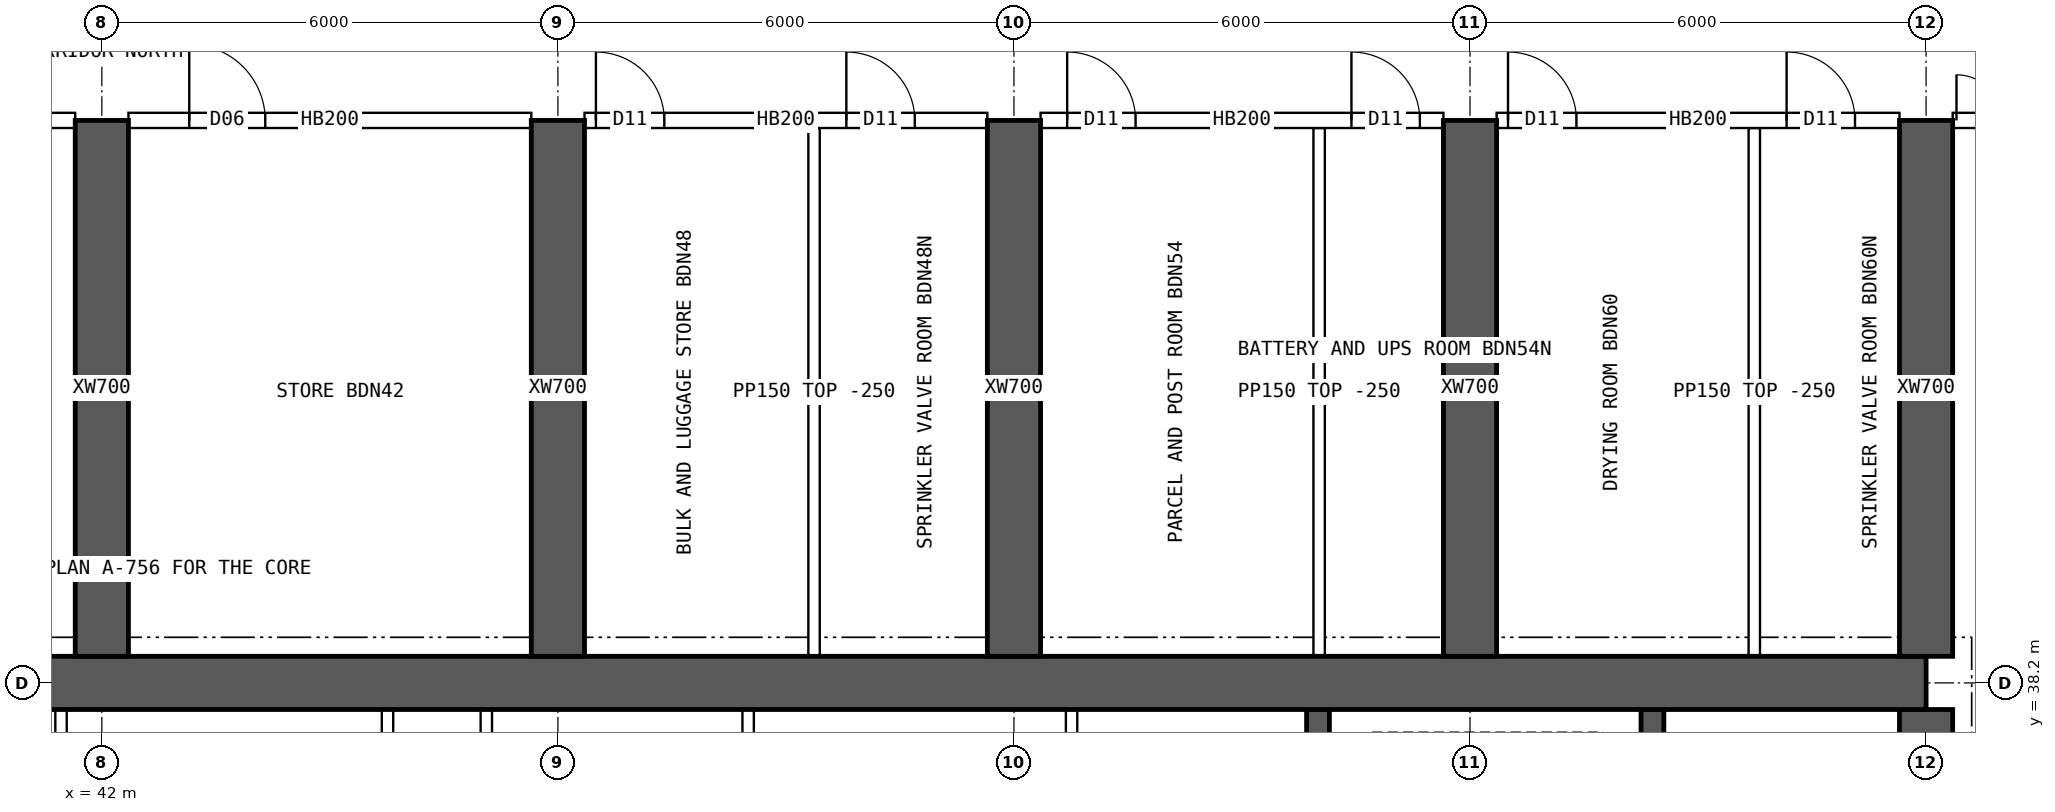
"""IFC4 building model, lengths in metres.
Left out: names, types, materials, properties, quantities, classifications, styles, units other than length and angle.
Written with IfcOpenShell. Run it as: python <this file> out.ifc"""

import sys

from ifc_helpers import new_model, si_unit, direction, frame, frame_2d, origin, place, context, subcontext, project, spatial, rectangle, extrude, element, fill, save


model = new_model("IFC4")
c1 = context("Model", 3, precision=1e-05, world=origin(), true_north=direction((0.0, 1.0)))
c2 = subcontext(c1, "Body", "Model", "MODEL_VIEW")
j1 = project(units=[si_unit("LENGTHUNIT", "METRE"), si_unit("PLANEANGLEUNIT", "RADIAN")], contexts=[c1])
p1 = place(None, origin())
s1 = spatial("IfcSite", under=j1, at=p1, CompositionType="ELEMENT")
p2 = place(p1, origin())
s2 = spatial("IfcBuilding", under=s1, at=p2, CompositionType="ELEMENT")
p3 = place(p2, frame((0.0, 0.0, 216.55)))
s3 = spatial("IfcBuildingStorey", under=s2, at=p3, CompositionType="ELEMENT", Elevation=216.55)
p4 = place(p3, frame((18.0, 38.2, 0.0), z_axis=(0.0, 0.0, 1.0), x_axis=(1.0, 0.0, 0.0)))
e1 = element("IfcWall", 1, at=p4, inside=s3, PredefinedType="SHEAR", context=c2, shape_type="SweptSolid", body=[
    extrude(rectangle(XDim=48.0, YDim=0.7, at=frame_2d((24.0, 0.0))), origin(), (0.0, 0.0, 1.0), 3.75),
])
p5 = place(p3, frame((66.0, 26.15, 0.0), z_axis=(0.0, 0.0, 1.0), x_axis=(0.0, 1.0, 0.0)))
e2 = element("IfcWall", 2, at=p5, inside=s3, PredefinedType="SHEAR", context=c2, shape_type="SweptSolid", body=[
    extrude(rectangle(XDim=11.7, YDim=0.7, at=frame_2d((5.85, 0.0))), origin(), (0.0, 0.0, 1.0), 3.75),
])
p6 = place(p5, frame((5.15, 0.0, 0.0)))
e3 = element("IfcOpeningElement", 3, at=p6, cuts=e2, PredefinedType="OPENING", context=c2, shape_type="SweptSolid", body=[
    extrude(rectangle(XDim=1.2, YDim=2.1, at=frame_2d((0.6, 1.05))), frame((0.0, 0.36, 0.0), z_axis=(0.0, -1.0, 0.0), x_axis=(1.0, 0.0, 0.0)), (0.0, 0.0, 1.0), 0.72),
])
for number, where, z_axis, x_axis in (
    (4, (62.4, 34.75, 0.0), (0.0, 0.0, 1.0), (0.0, 1.0, 0.0)),
    (5, (58.0, 34.75, 0.0), (0.0, 0.0, 1.0), (0.0, 1.0, 0.0)),
):
    element("IfcWall", number, at=place(p3, frame(where, z_axis=z_axis, x_axis=x_axis)), inside=s3, PredefinedType="SHEAR", context=c2, shape_type="SweptSolid", body=[
        extrude(rectangle(XDim=3.1, YDim=0.3, at=frame_2d((1.55, 0.0))), origin(), (0.0, 0.0, 1.0), 3.75),
    ])
for number, where, z_axis, x_axis in (
    (6, (42.0, 38.55, 0.0), (0.0, 0.0, 1.0), (0.0, 1.0, 0.0)),
    (7, (48.0, 38.55, 0.0), (0.0, 0.0, 1.0), (0.0, 1.0, 0.0)),
    (8, (54.0, 38.55, 0.0), (0.0, 0.0, 1.0), (0.0, 1.0, 0.0)),
    (9, (60.0, 38.55, 0.0), (0.0, 0.0, 1.0), (0.0, 1.0, 0.0)),
    (10, (66.0, 38.55, 0.0), (0.0, 0.0, 1.0), (0.0, 1.0, 0.0)),
):
    element("IfcWall", number, at=place(p3, frame(where, z_axis=z_axis, x_axis=x_axis)), inside=s3, PredefinedType="SHEAR", context=c2, shape_type="SweptSolid", body=[
        extrude(rectangle(XDim=7.05, YDim=0.7, at=frame_2d((3.525, 0.0))), origin(), (0.0, 0.0, 1.0), 3.75),
    ])
for number, where, z_axis, x_axis in (
    (11, (41.463, 34.75, 0.0), (0.0, 0.0, 1.0), (0.0, 1.0, 0.0)),
    (12, (45.758, 34.75, 0.0), (0.0, 0.0, 1.0), (0.0, 1.0, 0.0)),
    (13, (47.058, 34.75, 0.0), (0.0, 0.0, 1.0), (0.0, 1.0, 0.0)),
    (14, (50.503, 34.75, 0.0), (0.0, 0.0, 1.0), (0.0, 1.0, 0.0)),
    (15, (54.758, 34.75, 0.0), (0.0, 0.0, 1.0), (0.0, 1.0, 0.0)),
):
    element("IfcWall", number, at=place(p3, frame(where, z_axis=z_axis, x_axis=x_axis)), inside=s3, PredefinedType="SOLIDWALL", context=c2, shape_type="SweptSolid", body=[
        extrude(rectangle(XDim=3.1, YDim=0.15, at=frame_2d((1.55, 0.0))), origin(), (0.0, 0.0, 1.0), 3.5),
    ])
p7 = place(p3, frame((36.35, 45.6, 0.0), z_axis=(0.0, 0.0, 1.0), x_axis=(1.0, 0.0, 0.0)))
e16 = element("IfcWall", 16, at=p7, inside=s3, PredefinedType="SOLIDWALL", context=c2, shape_type="SweptSolid", body=[
    extrude(rectangle(XDim=5.3, YDim=0.2, at=frame_2d((2.65, 0.0))), origin(), (0.0, 0.0, 1.0), 3.5),
])
p8 = place(p7, frame((0.15, 0.0, 0.0)))
e17 = element("IfcOpeningElement", 17, at=p8, cuts=e16, PredefinedType="OPENING", context=c2, shape_type="SweptSolid", body=[
    extrude(rectangle(XDim=0.9, YDim=2.1, at=frame_2d((0.45, 1.05))), frame((0.0, 0.11, 0.0), z_axis=(0.0, -1.0, 0.0), x_axis=(1.0, 0.0, 0.0)), (0.0, 0.0, 1.0), 0.22),
])
p9 = place(p7, frame((2.15, 0.0, 0.0)))
e18 = element("IfcOpeningElement", 18, at=p9, cuts=e16, PredefinedType="OPENING", context=c2, shape_type="SweptSolid", body=[
    extrude(rectangle(XDim=0.9, YDim=2.1, at=frame_2d((0.45, 1.05))), frame((0.0, 0.11, 0.0), z_axis=(0.0, -1.0, 0.0), x_axis=(1.0, 0.0, 0.0)), (0.0, 0.0, 1.0), 0.22),
])
p10 = place(p3, frame((42.35, 45.6, 0.0), z_axis=(0.0, 0.0, 1.0), x_axis=(1.0, 0.0, 0.0)))
e19 = element("IfcWall", 19, at=p10, inside=s3, PredefinedType="SOLIDWALL", context=c2, shape_type="SweptSolid", body=[
    extrude(rectangle(XDim=5.3, YDim=0.2, at=frame_2d((2.65, 0.0))), origin(), (0.0, 0.0, 1.0), 3.5),
])
p11 = place(p10, frame((0.8, 0.0, 0.0)))
e20 = element("IfcOpeningElement", 20, at=p11, cuts=e19, PredefinedType="OPENING", context=c2, shape_type="SweptSolid", body=[
    extrude(rectangle(XDim=1.0, YDim=2.1, at=frame_2d((0.5, 1.05))), frame((0.0, 0.11, 0.0), z_axis=(0.0, -1.0, 0.0), x_axis=(1.0, 0.0, 0.0)), (0.0, 0.0, 1.0), 0.22),
])
p12 = place(p3, frame((48.35, 45.6, 0.0), z_axis=(0.0, 0.0, 1.0), x_axis=(1.0, 0.0, 0.0)))
e21 = element("IfcWall", 21, at=p12, inside=s3, PredefinedType="SOLIDWALL", context=c2, shape_type="SweptSolid", body=[
    extrude(rectangle(XDim=5.3, YDim=0.2, at=frame_2d((2.65, 0.0))), origin(), (0.0, 0.0, 1.0), 3.5),
])
p13 = place(p12, frame((0.15, 0.0, 0.0)))
e22 = element("IfcOpeningElement", 22, at=p13, cuts=e21, PredefinedType="OPENING", context=c2, shape_type="SweptSolid", body=[
    extrude(rectangle(XDim=0.9, YDim=2.1, at=frame_2d((0.45, 1.05))), frame((0.0, 0.11, 0.0), z_axis=(0.0, -1.0, 0.0), x_axis=(1.0, 0.0, 0.0)), (0.0, 0.0, 1.0), 0.22),
])
p14 = place(p12, frame((3.445, 0.0, 0.0)))
e23 = element("IfcOpeningElement", 23, at=p14, cuts=e21, PredefinedType="OPENING", context=c2, shape_type="SweptSolid", body=[
    extrude(rectangle(XDim=0.9, YDim=2.1, at=frame_2d((0.45, 1.05))), frame((0.0, 0.11, 0.0), z_axis=(0.0, -1.0, 0.0), x_axis=(1.0, 0.0, 0.0)), (0.0, 0.0, 1.0), 0.22),
])
p15 = place(p3, frame((54.35, 45.6, 0.0), z_axis=(0.0, 0.0, 1.0), x_axis=(1.0, 0.0, 0.0)))
e24 = element("IfcWall", 24, at=p15, inside=s3, PredefinedType="SOLIDWALL", context=c2, shape_type="SweptSolid", body=[
    extrude(rectangle(XDim=5.3, YDim=0.2, at=frame_2d((2.65, 0.0))), origin(), (0.0, 0.0, 1.0), 3.5),
])
p16 = place(p15, frame((0.35, 0.0, 0.0)))
e25 = element("IfcOpeningElement", 25, at=p16, cuts=e24, PredefinedType="OPENING", context=c2, shape_type="SweptSolid", body=[
    extrude(rectangle(XDim=0.9, YDim=2.1, at=frame_2d((0.45, 1.05))), frame((0.0, 0.11, 0.0), z_axis=(0.0, -1.0, 0.0), x_axis=(1.0, 0.0, 0.0)), (0.0, 0.0, 1.0), 0.22),
])
p17 = place(p15, frame((4.09, 0.0, 0.0)))
e26 = element("IfcOpeningElement", 26, at=p17, cuts=e24, PredefinedType="OPENING", context=c2, shape_type="SweptSolid", body=[
    extrude(rectangle(XDim=0.9, YDim=2.1, at=frame_2d((0.45, 1.05))), frame((0.0, 0.11, 0.0), z_axis=(0.0, -1.0, 0.0), x_axis=(1.0, 0.0, 0.0)), (0.0, 0.0, 1.0), 0.22),
])
p18 = place(p3, frame((60.35, 45.6, 0.0), z_axis=(0.0, 0.0, 1.0), x_axis=(1.0, 0.0, 0.0)))
e27 = element("IfcWall", 27, at=p18, inside=s3, PredefinedType="SOLIDWALL", context=c2, shape_type="SweptSolid", body=[
    extrude(rectangle(XDim=5.3, YDim=0.2, at=frame_2d((2.65, 0.0))), origin(), (0.0, 0.0, 1.0), 3.5),
])
p19 = place(p18, frame((0.15, 0.0, 0.0)))
e28 = element("IfcOpeningElement", 28, at=p19, cuts=e27, PredefinedType="OPENING", context=c2, shape_type="SweptSolid", body=[
    extrude(rectangle(XDim=0.9, YDim=2.1, at=frame_2d((0.45, 1.05))), frame((0.0, 0.11, 0.0), z_axis=(0.0, -1.0, 0.0), x_axis=(1.0, 0.0, 0.0)), (0.0, 0.0, 1.0), 0.22),
])
p20 = place(p18, frame((3.815, 0.0, 0.0)))
e29 = element("IfcOpeningElement", 29, at=p20, cuts=e27, PredefinedType="OPENING", context=c2, shape_type="SweptSolid", body=[
    extrude(rectangle(XDim=0.9, YDim=2.1, at=frame_2d((0.45, 1.05))), frame((0.0, 0.11, 0.0), z_axis=(0.0, -1.0, 0.0), x_axis=(1.0, 0.0, 0.0)), (0.0, 0.0, 1.0), 0.22),
])
p21 = place(p3, frame((66.35, 45.6, 0.0), z_axis=(0.0, 0.0, 1.0), x_axis=(1.0, 0.0, 0.0)))
e30 = element("IfcWall", 30, at=p21, inside=s3, PredefinedType="SOLIDWALL", context=c2, shape_type="SweptSolid", body=[
    extrude(rectangle(XDim=2.05, YDim=0.2, at=frame_2d((1.025, 0.0))), origin(), (0.0, 0.0, 1.0), 3.5),
])
p22 = place(p21, frame((0.05, 0.0, 0.0)))
e31 = element("IfcOpeningElement", 31, at=p22, cuts=e30, PredefinedType="OPENING", context=c2, shape_type="SweptSolid", body=[
    extrude(rectangle(XDim=1.2, YDim=2.1, at=frame_2d((0.6, 1.05))), frame((0.0, 0.11, 0.0), z_axis=(0.0, -1.0, 0.0), x_axis=(1.0, 0.0, 0.0)), (0.0, 0.0, 1.0), 0.22),
])
for number, where, z_axis, x_axis in (
    (32, (51.37, 38.55, 0.0), (0.0, 0.0, 1.0), (0.0, 1.0, 0.0)),
    (33, (58.015, 38.55, 0.0), (0.0, 0.0, 1.0), (0.0, 1.0, 0.0)),
    (34, (63.74, 38.55, 0.0), (0.0, 0.0, 1.0), (0.0, 1.0, 0.0)),
):
    element("IfcWall", number, at=place(p3, frame(where, z_axis=z_axis, x_axis=x_axis)), inside=s3, PredefinedType="PARTITIONING", context=c2, shape_type="SweptSolid", body=[
        extrude(rectangle(XDim=6.95, YDim=0.15, at=frame_2d((3.475, 0.0))), origin(), (0.0, 0.0, 1.0), 3.5),
    ])
p23 = place(p22, origin())
e35 = element("IfcDoor", 35, at=p23, inside=s3, OperationType="DOUBLE_DOOR_SINGLE_SWING", PredefinedType="DOOR", context=c2, shape_type="SweptSolid", body=[
    extrude(rectangle(XDim=1.2, YDim=2.1, at=frame_2d((0.6, 1.05))), frame((0.0, 0.025, 0.0), z_axis=(0.0, -1.0, 0.0), x_axis=(1.0, 0.0, 0.0)), (0.0, 0.0, 1.0), 0.05),
])
fill(e31, e35)
p24 = place(p11, origin())
e36 = element("IfcDoor", 36, at=p24, inside=s3, OperationType="SINGLE_SWING_LEFT", PredefinedType="DOOR", context=c2, shape_type="SweptSolid", body=[
    extrude(rectangle(XDim=1.0, YDim=2.1, at=frame_2d((0.5, 1.05))), frame((0.0, 0.025, 0.0), z_axis=(0.0, -1.0, 0.0), x_axis=(1.0, 0.0, 0.0)), (0.0, 0.0, 1.0), 0.05),
])
fill(e20, e36)
p25 = place(p13, origin())
e37 = element("IfcDoor", 37, at=p25, inside=s3, OperationType="SINGLE_SWING_LEFT", PredefinedType="DOOR", context=c2, shape_type="SweptSolid", body=[
    extrude(rectangle(XDim=0.9, YDim=2.1, at=frame_2d((0.45, 1.05))), frame((0.0, 0.025, 0.0), z_axis=(0.0, -1.0, 0.0), x_axis=(1.0, 0.0, 0.0)), (0.0, 0.0, 1.0), 0.05),
])
fill(e22, e37)
p26 = place(p14, origin())
e38 = element("IfcDoor", 38, at=p26, inside=s3, OperationType="SINGLE_SWING_LEFT", PredefinedType="DOOR", context=c2, shape_type="SweptSolid", body=[
    extrude(rectangle(XDim=0.9, YDim=2.1, at=frame_2d((0.45, 1.05))), frame((0.0, 0.025, 0.0), z_axis=(0.0, -1.0, 0.0), x_axis=(1.0, 0.0, 0.0)), (0.0, 0.0, 1.0), 0.05),
])
fill(e23, e38)
p27 = place(p16, origin())
e39 = element("IfcDoor", 39, at=p27, inside=s3, OperationType="SINGLE_SWING_LEFT", PredefinedType="DOOR", context=c2, shape_type="SweptSolid", body=[
    extrude(rectangle(XDim=0.9, YDim=2.1, at=frame_2d((0.45, 1.05))), frame((0.0, 0.025, 0.0), z_axis=(0.0, -1.0, 0.0), x_axis=(1.0, 0.0, 0.0)), (0.0, 0.0, 1.0), 0.05),
])
fill(e25, e39)
p28 = place(p17, origin())
e40 = element("IfcDoor", 40, at=p28, inside=s3, OperationType="SINGLE_SWING_LEFT", PredefinedType="DOOR", context=c2, shape_type="SweptSolid", body=[
    extrude(rectangle(XDim=0.9, YDim=2.1, at=frame_2d((0.45, 1.05))), frame((0.0, 0.025, 0.0), z_axis=(0.0, -1.0, 0.0), x_axis=(1.0, 0.0, 0.0)), (0.0, 0.0, 1.0), 0.05),
])
fill(e26, e40)
p29 = place(p19, origin())
e41 = element("IfcDoor", 41, at=p29, inside=s3, OperationType="SINGLE_SWING_LEFT", PredefinedType="DOOR", context=c2, shape_type="SweptSolid", body=[
    extrude(rectangle(XDim=0.9, YDim=2.1, at=frame_2d((0.45, 1.05))), frame((0.0, 0.025, 0.0), z_axis=(0.0, -1.0, 0.0), x_axis=(1.0, 0.0, 0.0)), (0.0, 0.0, 1.0), 0.05),
])
fill(e28, e41)
p30 = place(p20, origin())
e42 = element("IfcDoor", 42, at=p30, inside=s3, OperationType="SINGLE_SWING_LEFT", PredefinedType="DOOR", context=c2, shape_type="SweptSolid", body=[
    extrude(rectangle(XDim=0.9, YDim=2.1, at=frame_2d((0.45, 1.05))), frame((0.0, 0.025, 0.0), z_axis=(0.0, -1.0, 0.0), x_axis=(1.0, 0.0, 0.0)), (0.0, 0.0, 1.0), 0.05),
])
fill(e29, e42)
save(model, sys.argv[1])
